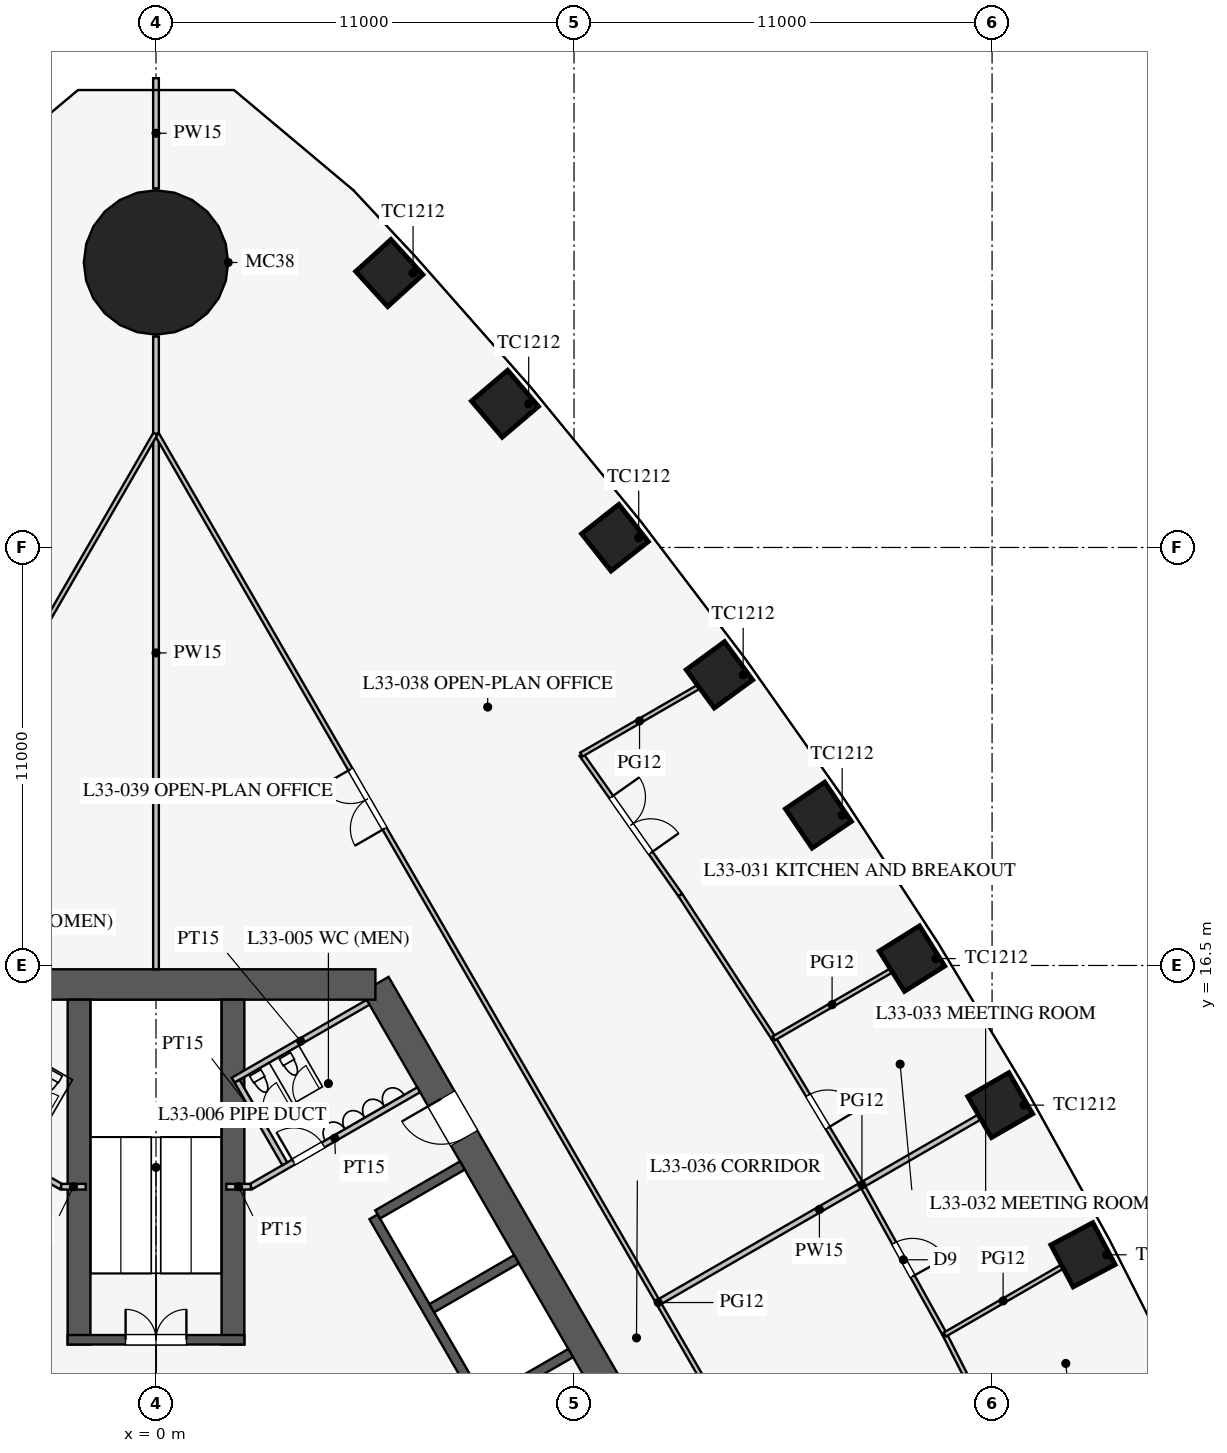
"""IFC4 building model, lengths in metres.
Left out: names, types, materials, properties, quantities, classifications, styles, units other than length and angle.
Written with IfcOpenShell. Run it as: python <this file> out.ifc"""

import sys

from ifc_helpers import new_model, si_unit, direction, frame, frame_2d, origin, origin_2d, place, context, subcontext, project, spatial, rectangle, circle, extrude, element, fill, save


model = new_model("IFC4")
c1 = context("Model", 3, precision=1e-05, world=origin(), true_north=direction((0.0, 1.0)))
c2 = subcontext(c1, "Body", "Model", "MODEL_VIEW")
j1 = project(units=[si_unit("LENGTHUNIT", "METRE"), si_unit("PLANEANGLEUNIT", "RADIAN")], contexts=[c1])
p1 = place(None, origin())
s1 = spatial("IfcSite", under=j1, at=p1, CompositionType="ELEMENT")
p2 = place(p1, origin())
s2 = spatial("IfcBuilding", under=s1, at=p2, CompositionType="ELEMENT")
p3 = place(p2, frame((0.0, 0.0, 145.1)))
s3 = spatial("IfcBuildingStorey", under=s2, at=p3, CompositionType="ELEMENT", Elevation=145.1)
for number, where, z_axis, x_axis in (
    (1, (24.393, 8.887, 0.0), (0.0, 0.0, 1.0), (-0.468, 0.883, 0.0)),
    (2, (22.213, 12.825, 0.0), (0.0, 0.0, 1.0), (-0.5, 0.866, 0.0)),
    (3, (19.893, 16.681, 0.0), (0.0, 0.0, 1.0), (-0.531, 0.847, 0.0)),
    (4, (17.43, 20.456, 0.0), (0.0, 0.0, 1.0), (-0.561, 0.828, 0.0)),
    (5, (14.825, 24.148, 0.0), (0.0, 0.0, 1.0), (-0.591, 0.807, 0.0)),
    (6, (12.077, 27.757, 0.0), (0.0, 0.0, 1.0), (-0.62, 0.785, 0.0)),
    (7, (9.182, 31.282, 0.0), (0.0, 0.0, 1.0), (-0.648, 0.762, 0.0)),
    (8, (6.139, 34.721, 0.0), (0.0, 0.0, 1.0), (-0.672, 0.74, 0.0)),
):
    element("IfcColumn", number, at=place(p3, frame(where, z_axis=z_axis, x_axis=x_axis)), inside=s3, PredefinedType="COLUMN", context=c2, shape_type="SweptSolid", body=[
        extrude(rectangle(XDim=1.25, YDim=1.25, at=origin_2d()), origin(), (0.0, 0.0, 1.0), 4.2),
    ])
p4 = place(p3, frame((0.0, 35.0, 0.0), z_axis=(0.0, 0.0, 1.0), x_axis=(1.0, 0.0, 0.0)))
e9 = element("IfcColumn", 9, at=p4, inside=s3, PredefinedType="COLUMN", context=c2, shape_type="SweptSolid", body=[
    extrude(circle(Radius=1.9, at=origin_2d()), origin(), (0.0, 0.0, 1.0), 4.2),
])
p5 = place(p3, frame((16.743, -3.0, 0.0), z_axis=(0.0, 0.0, 1.0), x_axis=(-0.500002442456, 0.866023993627, 0.0)))
e10 = element("IfcWall", 10, at=p5, inside=s3, PredefinedType="SHEAR", context=c2, shape_type="SweptSolid", body=[
    extrude(rectangle(XDim=21.939, YDim=0.8, at=frame_2d((10.97, 0.0))), origin(), (0.0, 0.0, 1.0), 4.2),
])
p6 = place(p5, frame((17.27, 0.0, 0.0)))
e11 = element("IfcOpeningElement", 11, at=p6, cuts=e10, PredefinedType="OPENING", context=c2, shape_type="SweptSolid", body=[
    extrude(rectangle(XDim=1.2, YDim=2.1, at=frame_2d((0.6, 1.05))), frame((0.0, 0.41, 0.0), z_axis=(0.0, -1.0, 0.0), x_axis=(1.0, 0.0, 0.0)), (0.0, 0.0, 1.0), 0.82),
])
p7 = place(p5, frame((3.47, 0.0, 0.0)))
e12 = element("IfcOpeningElement", 12, at=p7, cuts=e10, PredefinedType="OPENING", context=c2, shape_type="SweptSolid", body=[
    extrude(rectangle(XDim=1.2, YDim=2.1, at=frame_2d((0.6, 1.05))), frame((0.0, 0.41, 0.0), z_axis=(0.0, -1.0, 0.0), x_axis=(1.0, 0.0, 0.0)), (0.0, 0.0, 1.0), 0.82),
])
p8 = place(p3, frame((5.773, 16.0, 0.0), z_axis=(0.0, 0.0, 1.0), x_axis=(-1.0, 0.0, 0.0)))
e13 = element("IfcWall", 13, at=p8, inside=s3, PredefinedType="SHEAR", context=c2, shape_type="SweptSolid", body=[
    extrude(rectangle(XDim=11.547, YDim=0.8, at=frame_2d((5.773, 0.0))), origin(), (0.0, 0.0, 1.0), 4.2),
])
p9 = place(p3, frame((11.424, 0.014, 0.0), z_axis=(0.0, 0.0, 1.0), x_axis=(-0.500001763848, 0.866024385424, 0.0)))
e14 = element("IfcWall", 14, at=p9, inside=s3, PredefinedType="SHEAR", context=c2, shape_type="SweptSolid", body=[
    extrude(rectangle(XDim=11.4, YDim=0.25, at=frame_2d((5.7, 0.0))), origin(), (0.0, 0.0, 1.0), 4.2),
])
p10 = place(p9, frame((0.975, 0.0, 0.0)))
e15 = element("IfcOpeningElement", 15, at=p10, cuts=e14, PredefinedType="OPENING", context=c2, shape_type="SweptSolid", body=[
    extrude(rectangle(XDim=0.9, YDim=2.1, at=frame_2d((0.45, 1.05))), frame((0.0, 0.135, 0.0), z_axis=(0.0, -1.0, 0.0), x_axis=(1.0, 0.0, 0.0)), (0.0, 0.0, 1.0), 0.27),
])
p11 = place(p9, frame((3.825, 0.0, 0.0)))
e16 = element("IfcOpeningElement", 16, at=p11, cuts=e14, PredefinedType="OPENING", context=c2, shape_type="SweptSolid", body=[
    extrude(rectangle(XDim=0.9, YDim=2.1, at=frame_2d((0.45, 1.05))), frame((0.0, 0.135, 0.0), z_axis=(0.0, -1.0, 0.0), x_axis=(1.0, 0.0, 0.0)), (0.0, 0.0, 1.0), 0.27),
])
for number, where, z_axis, x_axis in (
    (17, (8.682, 5.012, 0.0), (0.0, 0.0, 1.0), (0.866, 0.5, 0.0)),
    (18, (7.257, 7.481, 0.0), (0.0, 0.0, 1.0), (0.866, 0.5, 0.0)),
):
    element("IfcWall", number, at=place(p3, frame(where, z_axis=z_axis, x_axis=x_axis)), inside=s3, PredefinedType="SHEAR", context=c2, shape_type="SweptSolid", body=[
        extrude(rectangle(XDim=2.575, YDim=0.25, at=frame_2d((1.288, 0.0))), origin(), (0.0, 0.0, 1.0), 4.2),
    ])
p12 = place(p3, frame((5.832, 9.949, 0.0), z_axis=(0.0, 0.0, 1.0), x_axis=(0.866029291668, 0.499993265928, 0.0)))
e19 = element("IfcWall", 19, at=p12, inside=s3, PredefinedType="SHEAR", context=c2, shape_type="SweptSolid", body=[
    extrude(rectangle(XDim=2.575, YDim=0.25, at=frame_2d((1.288, 0.0))), origin(), (0.0, 0.0, 1.0), 4.2),
])
for number, where, z_axis, x_axis in (
    (20, (2.025, 6.525, 0.0), (0.0, 0.0, 1.0), (0.0, 1.0, 0.0)),
    (21, (-2.025, 6.525, 0.0), (0.0, 0.0, 1.0), (0.0, 1.0, 0.0)),
):
    element("IfcWall", number, at=place(p3, frame(where, z_axis=z_axis, x_axis=x_axis)), inside=s3, PredefinedType="SHEAR", context=c2, shape_type="SweptSolid", body=[
        extrude(rectangle(XDim=9.075, YDim=0.6, at=frame_2d((4.538, 0.0))), origin(), (0.0, 0.0, 1.0), 4.2),
    ])
p13 = place(p3, frame((2.325, 6.65, 0.0), z_axis=(0.0, 0.0, 1.0), x_axis=(-1.0, 0.0, 0.0)))
e22 = element("IfcWall", 22, at=p13, inside=s3, PredefinedType="SHEAR", context=c2, shape_type="SweptSolid", body=[
    extrude(rectangle(XDim=4.65, YDim=0.25, at=frame_2d((2.325, 0.0))), origin(), (0.0, 0.0, 1.0), 4.2),
])
p14 = place(p13, frame((1.525, 0.0, 0.0)))
e23 = element("IfcOpeningElement", 23, at=p14, cuts=e22, PredefinedType="OPENING", context=c2, shape_type="SweptSolid", body=[
    extrude(rectangle(XDim=1.6, YDim=2.1, at=frame_2d((0.8, 1.05))), frame((0.0, 0.135, 0.0), z_axis=(0.0, -1.0, 0.0), x_axis=(1.0, 0.0, 0.0)), (0.0, 0.0, 1.0), 0.27),
])
p15 = place(p3, frame((2.495, 10.678, 0.0), z_axis=(0.0, 0.0, 1.0), x_axis=(0.86602216432, 0.500005610874, 0.0)))
e24 = element("IfcWall", 24, at=p15, inside=s3, PredefinedType="PARTITIONING", context=c2, shape_type="SweptSolid", body=[
    extrude(rectangle(XDim=5.1, YDim=0.15, at=frame_2d((2.55, 0.0))), origin(), (0.0, 0.0, 1.0), 4.0),
])
p16 = place(p15, frame((1.3, 0.0, 0.0)))
e25 = element("IfcOpeningElement", 25, at=p16, cuts=e24, PredefinedType="OPENING", context=c2, shape_type="SweptSolid", body=[
    extrude(rectangle(XDim=0.9, YDim=2.1, at=frame_2d((0.45, 1.05))), frame((0.0, 0.085, 0.0), z_axis=(0.0, -1.0, 0.0), x_axis=(1.0, 0.0, 0.0)), (0.0, 0.0, 1.0), 0.17),
])
p17 = place(p3, frame((-2.495, 10.678, 0.0), z_axis=(0.0, 0.0, 1.0), x_axis=(-0.86602216432, 0.500005610874, 0.0)))
e26 = element("IfcWall", 26, at=p17, inside=s3, PredefinedType="PARTITIONING", context=c2, shape_type="SweptSolid", body=[
    extrude(rectangle(XDim=5.1, YDim=0.15, at=frame_2d((2.55, 0.0))), origin(), (0.0, 0.0, 1.0), 4.0),
])
p18 = place(p17, frame((2.6, 0.0, 0.0)))
e27 = element("IfcOpeningElement", 27, at=p18, cuts=e26, PredefinedType="OPENING", context=c2, shape_type="SweptSolid", body=[
    extrude(rectangle(XDim=0.9, YDim=2.1, at=frame_2d((0.45, 1.05))), frame((0.0, 0.085, 0.0), z_axis=(0.0, -1.0, 0.0), x_axis=(1.0, 0.0, 0.0)), (0.0, 0.0, 1.0), 0.17),
])
for number, where, z_axis, x_axis in (
    (28, (2.495, 10.678, 0.0), (0.0, 0.0, 1.0), (-1.0, 0.0, 0.0)),
    (29, (-2.495, 10.678, 0.0), (0.0, 0.0, 1.0), (1.0, 0.0, 0.0)),
):
    element("IfcWall", number, at=place(p3, frame(where, z_axis=z_axis, x_axis=x_axis)), inside=s3, PredefinedType="PARTITIONING", context=c2, shape_type="SweptSolid", body=[
        extrude(rectangle(XDim=0.645, YDim=0.15, at=frame_2d((0.323, 0.0))), origin(), (0.0, 0.0, 1.0), 4.0),
    ])
p19 = place(p3, frame((2.031, 13.482, 0.0), z_axis=(0.0, 0.0, 1.0), x_axis=(0.866050731258, 0.499956128963, 0.0)))
e30 = element("IfcWall", 30, at=p19, inside=s3, PredefinedType="PARTITIONING", context=c2, shape_type="SweptSolid", body=[
    extrude(rectangle(XDim=4.1, YDim=0.15, at=frame_2d((2.05, 0.0))), origin(), (0.0, 0.0, 1.0), 4.0),
])
p20 = place(p3, frame((3.389, 11.281, 0.0), z_axis=(0.0, 0.0, 1.0), x_axis=(-0.499989096993, 0.866031698547, 0.0)))
e31 = element("IfcWall", 31, at=p20, inside=s3, PredefinedType="PARTITIONING", context=c2, shape_type="SweptSolid", body=[
    extrude(rectangle(XDim=2.51, YDim=0.15, at=frame_2d((1.255, 0.0))), origin(), (0.0, 0.0, 1.0), 4.0),
])
p21 = place(p3, frame((0.0, 16.4, 0.0), z_axis=(0.0, 0.0, 1.0), x_axis=(0.0, 1.0, 0.0)))
e32 = element("IfcWall", 32, at=p21, inside=s3, PredefinedType="PARTITIONING", context=c2, shape_type="SweptSolid", body=[
    extrude(rectangle(XDim=16.65, YDim=0.15, at=frame_2d((8.325, 0.0))), origin(), (0.0, 0.0, 1.0), 2.3),
])
p22 = place(p3, frame((0.0, 36.95, 0.0), z_axis=(0.0, 0.0, 1.0), x_axis=(0.0, 1.0, 0.0)))
e33 = element("IfcWall", 33, at=p22, inside=s3, PredefinedType="PARTITIONING", context=c2, shape_type="SweptSolid", body=[
    extrude(rectangle(XDim=2.899, YDim=0.15, at=frame_2d((1.45, 0.0))), origin(), (0.0, 0.0, 1.0), 2.3),
])
p23 = place(p3, frame((13.268, 7.66, 0.0), z_axis=(0.0, 0.0, 1.0), x_axis=(0.866020011605, 0.500009339412, 0.0)))
e34 = element("IfcWall", 34, at=p23, inside=s3, PredefinedType="PARTITIONING", context=c2, shape_type="SweptSolid", body=[
    extrude(rectangle(XDim=9.675, YDim=0.15, at=frame_2d((4.837, 0.0))), origin(), (0.0, 0.0, 1.0), 3.2),
])
p24 = place(p3, frame((26.415, -15.231, 0.0), z_axis=(0.0, 0.0, 1.0), x_axis=(-0.50000091641, 0.866024874695, 0.0)))
e35 = element("IfcWall", 35, at=p24, inside=s3, PredefinedType="PARTITIONING", context=c2, shape_type="SweptSolid", body=[
    extrude(rectangle(XDim=52.796, YDim=0.12, at=frame_2d((26.398, 0.0))), origin(), (0.0, 0.0, 1.0), 2.9),
])
p25 = place(p24, frame((10.2, 0.0, 0.15)))
e36 = element("IfcOpeningElement", 36, at=p25, cuts=e35, PredefinedType="OPENING", context=c2, shape_type="SweptSolid", body=[
    extrude(rectangle(XDim=1.8, YDim=2.1, at=frame_2d((0.9, 1.05))), frame((0.0, 0.07, 0.0), z_axis=(0.0, -1.0, 0.0), x_axis=(1.0, 0.0, 0.0)), (0.0, 0.0, 1.0), 0.14),
])
p26 = place(p24, frame((40.8, 0.0, 0.15)))
e37 = element("IfcOpeningElement", 37, at=p26, cuts=e35, PredefinedType="OPENING", context=c2, shape_type="SweptSolid", body=[
    extrude(rectangle(XDim=1.8, YDim=2.1, at=frame_2d((0.9, 1.05))), frame((0.0, 0.07, 0.0), z_axis=(0.0, -1.0, 0.0), x_axis=(1.0, 0.0, 0.0)), (0.0, 0.0, 1.0), 0.14),
])
p27 = place(p3, frame((18.576, 10.725, 0.0), z_axis=(0.0, 0.0, 1.0), x_axis=(-0.515548366618, 0.856860479703, 0.0)))
e38 = element("IfcWall", 38, at=p27, inside=s3, PredefinedType="PARTITIONING", context=c2, shape_type="SweptSolid", body=[
    extrude(rectangle(XDim=4.501, YDim=0.12, at=frame_2d((2.25, 0.0))), origin(), (0.0, 0.0, 1.0), 2.9),
])
p28 = place(p27, frame((1.75, 0.0, 0.15)))
e39 = element("IfcOpeningElement", 39, at=p28, cuts=e38, PredefinedType="OPENING", context=c2, shape_type="SweptSolid", body=[
    extrude(rectangle(XDim=1.0, YDim=2.1, at=frame_2d((0.5, 1.05))), frame((0.0, 0.07, 0.0), z_axis=(0.0, -1.0, 0.0), x_axis=(1.0, 0.0, 0.0)), (0.0, 0.0, 1.0), 0.14),
])
p29 = place(p3, frame((16.256, 14.581, 0.0), z_axis=(0.0, 0.0, 1.0), x_axis=(-0.546069464151, 0.837739900161, 0.0)))
e40 = element("IfcWall", 40, at=p29, inside=s3, PredefinedType="PARTITIONING", context=c2, shape_type="SweptSolid", body=[
    extrude(rectangle(XDim=4.507, YDim=0.12, at=frame_2d((2.253, 0.0))), origin(), (0.0, 0.0, 1.0), 2.9),
])
p30 = place(p3, frame((13.795, 18.357, 0.0), z_axis=(0.0, 0.0, 1.0), x_axis=(-0.575987178736, 0.817458726745, 0.0)))
e41 = element("IfcWall", 41, at=p30, inside=s3, PredefinedType="PARTITIONING", context=c2, shape_type="SweptSolid", body=[
    extrude(rectangle(XDim=4.518, YDim=0.12, at=frame_2d((2.259, 0.0))), origin(), (0.0, 0.0, 1.0), 2.9),
])
p31 = place(p30, frame((1.35, 0.0, 0.15)))
e42 = element("IfcOpeningElement", 42, at=p31, cuts=e41, PredefinedType="OPENING", context=c2, shape_type="SweptSolid", body=[
    extrude(rectangle(XDim=1.8, YDim=2.1, at=frame_2d((0.9, 1.05))), frame((0.0, 0.07, 0.0), z_axis=(0.0, -1.0, 0.0), x_axis=(1.0, 0.0, 0.0)), (0.0, 0.0, 1.0), 0.14),
])
p32 = place(p3, frame((20.756, 6.787, 0.0), z_axis=(0.0, 0.0, 1.0), x_axis=(-0.484292898211, 0.874905931368, 0.0)))
e43 = element("IfcWall", 43, at=p32, inside=s3, PredefinedType="PARTITIONING", context=c2, shape_type="SweptSolid", body=[
    extrude(rectangle(XDim=4.501, YDim=0.12, at=frame_2d((2.25, 0.0))), origin(), (0.0, 0.0, 1.0), 2.9),
])
p33 = place(p32, frame((1.75, 0.0, 0.15)))
e44 = element("IfcOpeningElement", 44, at=p33, cuts=e43, PredefinedType="OPENING", context=c2, shape_type="SweptSolid", body=[
    extrude(rectangle(XDim=1.0, YDim=2.1, at=frame_2d((0.5, 1.05))), frame((0.0, 0.07, 0.0), z_axis=(0.0, -1.0, 0.0), x_axis=(1.0, 0.0, 0.0)), (0.0, 0.0, 1.0), 0.14),
])
p34 = place(p3, frame((22.795, 2.768, 0.0), z_axis=(0.0, 0.0, 1.0), x_axis=(-0.452471679136, 0.891778772779, 0.0)))
e45 = element("IfcWall", 45, at=p34, inside=s3, PredefinedType="PARTITIONING", context=c2, shape_type="SweptSolid", body=[
    extrude(rectangle(XDim=4.507, YDim=0.12, at=frame_2d((2.253, 0.0))), origin(), (0.0, 0.0, 1.0), 2.9),
])
p35 = place(p34, frame((1.75, 0.0, 0.15)))
e46 = element("IfcOpeningElement", 46, at=p35, cuts=e45, PredefinedType="OPENING", context=c2, shape_type="SweptSolid", body=[
    extrude(rectangle(XDim=1.0, YDim=2.1, at=frame_2d((0.5, 1.05))), frame((0.0, 0.07, 0.0), z_axis=(0.0, -1.0, 0.0), x_axis=(1.0, 0.0, 0.0)), (0.0, 0.0, 1.0), 0.14),
])
p36 = place(p3, frame((11.192, 22.05, 0.0), z_axis=(0.0, 0.0, 1.0), x_axis=(0.86605108476, 0.499955516607, 0.0)))
e47 = element("IfcWall", 47, at=p36, inside=s3, PredefinedType="PARTITIONING", context=c2, shape_type="SweptSolid", body=[
    extrude(rectangle(XDim=3.536, YDim=0.12, at=frame_2d((1.768, 0.0))), origin(), (0.0, 0.0, 1.0), 2.9),
])
for number, where, z_axis, x_axis in (
    (48, (16.256, 14.581, 0.0), (0.0, 0.0, 1.0), (0.866, 0.5, 0.0)),
    (49, (20.756, 6.787, 0.0), (0.0, 0.0, 1.0), (0.866, 0.5, 0.0)),
):
    element("IfcWall", number, at=place(p3, frame(where, z_axis=z_axis, x_axis=x_axis)), inside=s3, PredefinedType="PARTITIONING", context=c2, shape_type="SweptSolid", body=[
        extrude(rectangle(XDim=3.544, YDim=0.12, at=frame_2d((1.772, 0.0))), origin(), (0.0, 0.0, 1.0), 2.9),
    ])
p37 = place(p3, frame((-0.016, 30.491, 0.0), z_axis=(0.0, 0.0, 1.0), x_axis=(-0.50000091641, -0.866024874695, 0.0)))
e50 = element("IfcWall", 50, at=p37, inside=s3, PredefinedType="PARTITIONING", context=c2, shape_type="SweptSolid", body=[
    extrude(rectangle(XDim=52.796, YDim=0.12, at=frame_2d((26.398, 0.0))), origin(), (0.0, 0.0, 1.0), 2.9),
])
p38 = place(p37, frame((10.2, 0.0, 0.15)))
e51 = element("IfcOpeningElement", 51, at=p38, cuts=e50, PredefinedType="OPENING", context=c2, shape_type="SweptSolid", body=[
    extrude(rectangle(XDim=1.8, YDim=2.1, at=frame_2d((0.9, 1.05))), frame((0.0, 0.07, 0.0), z_axis=(0.0, -1.0, 0.0), x_axis=(1.0, 0.0, 0.0)), (0.0, 0.0, 1.0), 0.14),
])
p39 = place(p37, frame((40.8, 0.0, 0.15)))
e52 = element("IfcOpeningElement", 52, at=p39, cuts=e50, PredefinedType="OPENING", context=c2, shape_type="SweptSolid", body=[
    extrude(rectangle(XDim=1.8, YDim=2.1, at=frame_2d((0.9, 1.05))), frame((0.0, 0.07, 0.0), z_axis=(0.0, -1.0, 0.0), x_axis=(1.0, 0.0, 0.0)), (0.0, 0.0, 1.0), 0.14),
])
p40 = place(p16, origin())
e53 = element("IfcDoor", 53, at=p40, inside=s3, OperationType="SINGLE_SWING_LEFT", PredefinedType="DOOR", context=c2, shape_type="SweptSolid", body=[
    extrude(rectangle(XDim=0.9, YDim=2.1, at=frame_2d((0.45, 1.05))), frame((0.0, 0.025, 0.0), z_axis=(0.0, -1.0, 0.0), x_axis=(1.0, 0.0, 0.0)), (0.0, 0.0, 1.0), 0.05),
])
fill(e25, e53)
p41 = place(p14, frame((1.6, 0.0, 0.0), z_axis=(0.0, 0.0, 1.0), x_axis=(-1.0, 0.0, 0.0)))
e54 = element("IfcDoor", 54, at=p41, inside=s3, OperationType="DOUBLE_DOOR_SINGLE_SWING", PredefinedType="DOOR", context=c2, shape_type="SweptSolid", body=[
    extrude(rectangle(XDim=1.6, YDim=2.1, at=frame_2d((0.8, 1.05))), frame((0.0, 0.025, 0.0), z_axis=(0.0, -1.0, 0.0), x_axis=(1.0, 0.0, 0.0)), (0.0, 0.0, 1.0), 0.05),
])
fill(e23, e54)
p42 = place(p6, origin())
e55 = element("IfcDoor", 55, at=p42, inside=s3, OperationType="SINGLE_SWING_RIGHT", PredefinedType="DOOR", context=c2, shape_type="SweptSolid", body=[
    extrude(rectangle(XDim=1.2, YDim=2.1, at=frame_2d((0.6, 1.05))), frame((0.0, 0.025, 0.0), z_axis=(0.0, -1.0, 0.0), x_axis=(1.0, 0.0, 0.0)), (0.0, 0.0, 1.0), 0.05),
])
fill(e11, e55)
p43 = place(p31, frame((1.8, 0.0, 0.0), z_axis=(0.0, 0.0, 1.0), x_axis=(-1.0, 0.0, 0.0)))
e56 = element("IfcDoor", 56, at=p43, inside=s3, OperationType="DOUBLE_DOOR_SINGLE_SWING", PredefinedType="DOOR", context=c2, shape_type="SweptSolid", body=[
    extrude(rectangle(XDim=1.8, YDim=2.1, at=frame_2d((0.9, 1.05))), frame((0.0, 0.025, 0.0), z_axis=(0.0, -1.0, 0.0), x_axis=(1.0, 0.0, 0.0)), (0.0, 0.0, 1.0), 0.05),
])
fill(e42, e56)
p44 = place(p28, frame((1.0, 0.0, 0.0), z_axis=(0.0, 0.0, 1.0), x_axis=(-1.0, 0.0, 0.0)))
e57 = element("IfcDoor", 57, at=p44, inside=s3, OperationType="SINGLE_SWING_RIGHT", PredefinedType="DOOR", context=c2, shape_type="SweptSolid", body=[
    extrude(rectangle(XDim=1.0, YDim=2.1, at=frame_2d((0.5, 1.05))), frame((0.0, 0.025, 0.0), z_axis=(0.0, -1.0, 0.0), x_axis=(1.0, 0.0, 0.0)), (0.0, 0.0, 1.0), 0.05),
])
fill(e39, e57)
p45 = place(p33, frame((1.0, 0.0, 0.0), z_axis=(0.0, 0.0, 1.0), x_axis=(-1.0, 0.0, 0.0)))
e58 = element("IfcDoor", 58, at=p45, inside=s3, OperationType="SINGLE_SWING_RIGHT", PredefinedType="DOOR", context=c2, shape_type="SweptSolid", body=[
    extrude(rectangle(XDim=1.0, YDim=2.1, at=frame_2d((0.5, 1.05))), frame((0.0, 0.025, 0.0), z_axis=(0.0, -1.0, 0.0), x_axis=(1.0, 0.0, 0.0)), (0.0, 0.0, 1.0), 0.05),
])
fill(e44, e58)
p46 = place(p26, origin())
e59 = element("IfcDoor", 59, at=p46, inside=s3, OperationType="DOUBLE_DOOR_SINGLE_SWING", PredefinedType="DOOR", context=c2, shape_type="SweptSolid", body=[
    extrude(rectangle(XDim=1.8, YDim=2.1, at=frame_2d((0.9, 1.05))), frame((0.0, 0.025, 0.0), z_axis=(0.0, -1.0, 0.0), x_axis=(1.0, 0.0, 0.0)), (0.0, 0.0, 1.0), 0.05),
])
fill(e37, e59)
save(model, sys.argv[1])
